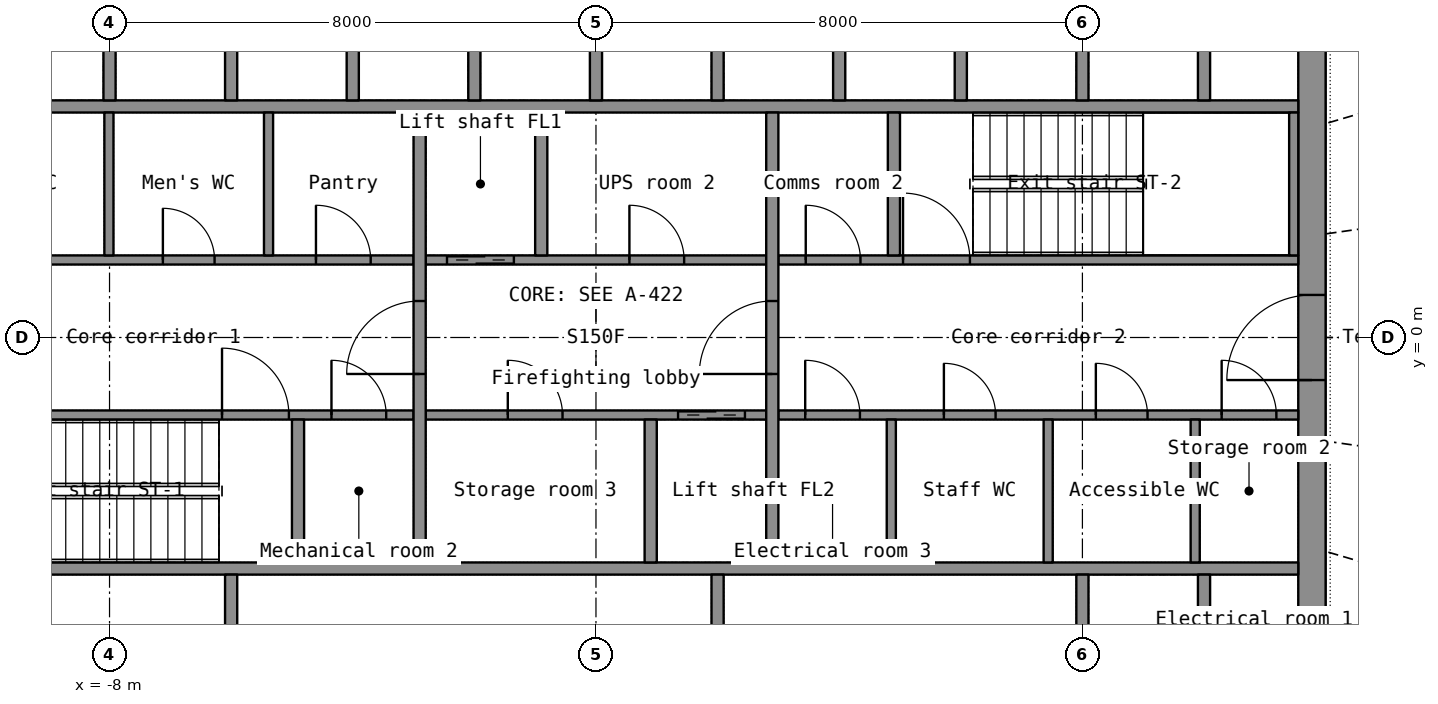
"""IFC4 building model, lengths in metres.
Left out: names, types, materials, properties, quantities, classifications, styles, units other than length and angle.
Written with IfcOpenShell. Run it as: python <this file> out.ifc"""

import sys

from ifc_helpers import new_model, si_unit, direction, frame, frame_2d, origin, place, context, subcontext, project, spatial, rectangle, extrude, element, fill, save


model = new_model("IFC4")
c1 = context("Model", 3, precision=1e-05, world=origin(), true_north=direction((0.0, 1.0)))
c2 = subcontext(c1, "Body", "Model", "MODEL_VIEW")
j1 = project(units=[si_unit("LENGTHUNIT", "METRE"), si_unit("PLANEANGLEUNIT", "RADIAN")], contexts=[c1])
p1 = place(None, origin())
s1 = spatial("IfcSite", under=j1, at=p1, CompositionType="ELEMENT")
p2 = place(p1, origin())
s2 = spatial("IfcBuilding", under=s1, at=p2, CompositionType="ELEMENT")
p3 = place(p2, frame((0.0, 0.0, 164.5)))
s3 = spatial("IfcBuildingStorey", under=s2, at=p3, CompositionType="ELEMENT", Elevation=164.5)
p4 = place(p3, frame((11.775, -7.2, 0.0), z_axis=(0.0, 0.0, 1.0), x_axis=(0.0, 1.0, 0.0)))
e1 = element("IfcWall", 1, at=p4, inside=s3, PredefinedType="SHEAR", context=c2, shape_type="SweptSolid", body=[
    extrude(rectangle(XDim=14.4, YDim=0.45, at=frame_2d((7.2, 0.0))), origin(), (0.0, 0.0, 1.0), 3.3),
])
p5 = place(p4, frame((6.5, 0.0, 0.0)))
e2 = element("IfcOpeningElement", 2, at=p5, cuts=e1, PredefinedType="OPENING", context=c2, shape_type="SweptSolid", body=[
    extrude(rectangle(XDim=1.4, YDim=2.2, at=frame_2d((0.7, 1.1))), frame((0.0, 0.235, 0.0), z_axis=(0.0, -1.0, 0.0), x_axis=(1.0, 0.0, 0.0)), (0.0, 0.0, 1.0), 0.47),
])
for number, where, z_axis, x_axis in (
    (3, (-11.55, -3.8, 0.0), (0.0, 0.0, 1.0), (1.0, 0.0, 0.0)),
    (4, (-11.55, 3.8, 0.0), (0.0, 0.0, 1.0), (1.0, 0.0, 0.0)),
):
    element("IfcWall", number, at=place(p3, frame(where, z_axis=z_axis, x_axis=x_axis)), inside=s3, PredefinedType="SHEAR", context=c2, shape_type="SweptSolid", body=[
        extrude(rectangle(XDim=23.1, YDim=0.2, at=frame_2d((11.55, 0.0))), origin(), (0.0, 0.0, 1.0), 3.3),
    ])
for number, where, z_axis, x_axis in (
    (5, (8.0, -6.75, 0.0), (0.0, 0.0, 1.0), (0.0, 1.0, 0.0)),
    (6, (10.0, -6.75, 0.0), (0.0, 0.0, 1.0), (0.0, 1.0, 0.0)),
):
    element("IfcWall", number, at=place(p3, frame(where, z_axis=z_axis, x_axis=x_axis)), inside=s3, PredefinedType="SHEAR", context=c2, shape_type="SweptSolid", body=[
        extrude(rectangle(XDim=2.85, YDim=0.2, at=frame_2d((1.425, 0.0))), origin(), (0.0, 0.0, 1.0), 3.3),
    ])
for number, where, z_axis, x_axis in (
    (7, (-6.0, -6.75, 0.0), (0.0, 0.0, 1.0), (0.0, 1.0, 0.0)),
    (8, (2.0, -6.75, 0.0), (0.0, 0.0, 1.0), (0.0, 1.0, 0.0)),
):
    element("IfcWall", number, at=place(p3, frame(where, z_axis=z_axis, x_axis=x_axis)), inside=s3, PredefinedType="PARTITIONING", context=c2, shape_type="SweptSolid", body=[
        extrude(rectangle(XDim=2.85, YDim=0.2, at=frame_2d((1.425, 0.0))), origin(), (0.0, 0.0, 1.0), 3.3),
    ])
for number, where, z_axis, x_axis in (
    (9, (-8.0, 3.9, 0.0), (0.0, 0.0, 1.0), (0.0, 1.0, 0.0)),
    (10, (-6.0, 3.9, 0.0), (0.0, 0.0, 1.0), (0.0, 1.0, 0.0)),
    (11, (-4.0, 3.9, 0.0), (0.0, 0.0, 1.0), (0.0, 1.0, 0.0)),
    (12, (-2.0, 3.9, 0.0), (0.0, 0.0, 1.0), (0.0, 1.0, 0.0)),
    (13, (0.0, 3.9, 0.0), (0.0, 0.0, 1.0), (0.0, 1.0, 0.0)),
    (14, (2.0, 3.9, 0.0), (0.0, 0.0, 1.0), (0.0, 1.0, 0.0)),
    (15, (4.0, 3.9, 0.0), (0.0, 0.0, 1.0), (0.0, 1.0, 0.0)),
    (16, (6.0, 3.9, 0.0), (0.0, 0.0, 1.0), (0.0, 1.0, 0.0)),
    (17, (8.0, 3.9, 0.0), (0.0, 0.0, 1.0), (0.0, 1.0, 0.0)),
    (18, (10.0, 3.9, 0.0), (0.0, 0.0, 1.0), (0.0, 1.0, 0.0)),
):
    element("IfcWall", number, at=place(p3, frame(where, z_axis=z_axis, x_axis=x_axis)), inside=s3, PredefinedType="SHEAR", context=c2, shape_type="SweptSolid", body=[
        extrude(rectangle(XDim=2.85, YDim=0.2, at=frame_2d((1.425, 0.0))), origin(), (0.0, 0.0, 1.0), 3.3),
    ])
p6 = place(p3, frame((-11.55, -1.275, 0.0), z_axis=(0.0, 0.0, 1.0), x_axis=(1.0, 0.0, 0.0)))
e19 = element("IfcWall", 19, at=p6, inside=s3, PredefinedType="SHEAR", context=c2, shape_type="SweptSolid", body=[
    extrude(rectangle(XDim=8.55, YDim=0.15, at=frame_2d((4.275, 0.0))), origin(), (0.0, 0.0, 1.0), 3.3),
])
p7 = place(p6, frame((5.4, 0.0, 0.0)))
e20 = element("IfcOpeningElement", 20, at=p7, cuts=e19, PredefinedType="OPENING", context=c2, shape_type="SweptSolid", body=[
    extrude(rectangle(XDim=1.1, YDim=2.15, at=frame_2d((0.55, 1.075))), frame((0.0, 0.085, 0.0), z_axis=(0.0, -1.0, 0.0), x_axis=(1.0, 0.0, 0.0)), (0.0, 0.0, 1.0), 0.17),
])
p8 = place(p6, frame((7.2, 0.0, 0.0)))
e21 = element("IfcOpeningElement", 21, at=p8, cuts=e19, PredefinedType="OPENING", context=c2, shape_type="SweptSolid", body=[
    extrude(rectangle(XDim=0.9, YDim=2.1, at=frame_2d((0.45, 1.05))), frame((0.0, 0.085, 0.0), z_axis=(0.0, -1.0, 0.0), x_axis=(1.0, 0.0, 0.0)), (0.0, 0.0, 1.0), 0.17),
])
p9 = place(p3, frame((-2.8, -1.275, 0.0), z_axis=(0.0, 0.0, 1.0), x_axis=(1.0, 0.0, 0.0)))
e22 = element("IfcWall", 22, at=p9, inside=s3, PredefinedType="SHEAR", context=c2, shape_type="SweptSolid", body=[
    extrude(rectangle(XDim=5.6, YDim=0.15, at=frame_2d((2.8, 0.0))), origin(), (0.0, 0.0, 1.0), 3.3),
])
p10 = place(p9, frame((4.15, 0.0, 0.0)))
e23 = element("IfcOpeningElement", 23, at=p10, cuts=e22, PredefinedType="OPENING", context=c2, shape_type="SweptSolid", body=[
    extrude(rectangle(XDim=1.1, YDim=2.2, at=frame_2d((0.55, 1.1))), frame((0.0, 0.085, 0.0), z_axis=(0.0, -1.0, 0.0), x_axis=(1.0, 0.0, 0.0)), (0.0, 0.0, 1.0), 0.17),
])
p11 = place(p9, frame((1.35, 0.0, 0.0)))
e24 = element("IfcOpeningElement", 24, at=p11, cuts=e22, PredefinedType="OPENING", context=c2, shape_type="SweptSolid", body=[
    extrude(rectangle(XDim=0.9, YDim=2.1, at=frame_2d((0.45, 1.05))), frame((0.0, 0.085, 0.0), z_axis=(0.0, -1.0, 0.0), x_axis=(1.0, 0.0, 0.0)), (0.0, 0.0, 1.0), 0.17),
])
p12 = place(p3, frame((3.0, -1.275, 0.0), z_axis=(0.0, 0.0, 1.0), x_axis=(1.0, 0.0, 0.0)))
e25 = element("IfcWall", 25, at=p12, inside=s3, PredefinedType="PARTITIONING", context=c2, shape_type="SweptSolid", body=[
    extrude(rectangle(XDim=8.55, YDim=0.15, at=frame_2d((4.275, 0.0))), origin(), (0.0, 0.0, 1.0), 3.3),
])
p13 = place(p12, frame((0.441, 0.0, 0.0)))
e26 = element("IfcOpeningElement", 26, at=p13, cuts=e25, PredefinedType="OPENING", context=c2, shape_type="SweptSolid", body=[
    extrude(rectangle(XDim=0.9, YDim=2.1, at=frame_2d((0.45, 1.05))), frame((0.0, 0.085, 0.0), z_axis=(0.0, -1.0, 0.0), x_axis=(1.0, 0.0, 0.0)), (0.0, 0.0, 1.0), 0.17),
])
p14 = place(p12, frame((2.722, 0.0, 0.0)))
e27 = element("IfcOpeningElement", 27, at=p14, cuts=e25, PredefinedType="OPENING", context=c2, shape_type="SweptSolid", body=[
    extrude(rectangle(XDim=0.85, YDim=2.1, at=frame_2d((0.425, 1.05))), frame((0.0, 0.085, 0.0), z_axis=(0.0, -1.0, 0.0), x_axis=(1.0, 0.0, 0.0)), (0.0, 0.0, 1.0), 0.17),
])
p15 = place(p12, frame((5.221, 0.0, 0.0)))
e28 = element("IfcOpeningElement", 28, at=p15, cuts=e25, PredefinedType="OPENING", context=c2, shape_type="SweptSolid", body=[
    extrude(rectangle(XDim=0.85, YDim=2.1, at=frame_2d((0.425, 1.05))), frame((0.0, 0.085, 0.0), z_axis=(0.0, -1.0, 0.0), x_axis=(1.0, 0.0, 0.0)), (0.0, 0.0, 1.0), 0.17),
])
p16 = place(p12, frame((7.29, 0.0, 0.0)))
e29 = element("IfcOpeningElement", 29, at=p16, cuts=e25, PredefinedType="OPENING", context=c2, shape_type="SweptSolid", body=[
    extrude(rectangle(XDim=0.9, YDim=2.1, at=frame_2d((0.45, 1.05))), frame((0.0, 0.085, 0.0), z_axis=(0.0, -1.0, 0.0), x_axis=(1.0, 0.0, 0.0)), (0.0, 0.0, 1.0), 0.17),
])
p17 = place(p3, frame((-11.55, 1.275, 0.0), z_axis=(0.0, 0.0, 1.0), x_axis=(1.0, 0.0, 0.0)))
e30 = element("IfcWall", 30, at=p17, inside=s3, PredefinedType="PARTITIONING", context=c2, shape_type="SweptSolid", body=[
    extrude(rectangle(XDim=8.55, YDim=0.15, at=frame_2d((4.275, 0.0))), origin(), (0.0, 0.0, 1.0), 3.3),
])
p18 = place(p17, frame((1.308, 0.0, 0.0)))
e31 = element("IfcOpeningElement", 31, at=p18, cuts=e30, PredefinedType="OPENING", context=c2, shape_type="SweptSolid", body=[
    extrude(rectangle(XDim=0.85, YDim=2.1, at=frame_2d((0.425, 1.05))), frame((0.0, 0.085, 0.0), z_axis=(0.0, -1.0, 0.0), x_axis=(1.0, 0.0, 0.0)), (0.0, 0.0, 1.0), 0.17),
])
p19 = place(p17, frame((4.427, 0.0, 0.0)))
e32 = element("IfcOpeningElement", 32, at=p19, cuts=e30, PredefinedType="OPENING", context=c2, shape_type="SweptSolid", body=[
    extrude(rectangle(XDim=0.85, YDim=2.1, at=frame_2d((0.425, 1.05))), frame((0.0, 0.085, 0.0), z_axis=(0.0, -1.0, 0.0), x_axis=(1.0, 0.0, 0.0)), (0.0, 0.0, 1.0), 0.17),
])
p20 = place(p17, frame((6.945, 0.0, 0.0)))
e33 = element("IfcOpeningElement", 33, at=p20, cuts=e30, PredefinedType="OPENING", context=c2, shape_type="SweptSolid", body=[
    extrude(rectangle(XDim=0.9, YDim=2.1, at=frame_2d((0.45, 1.05))), frame((0.0, 0.085, 0.0), z_axis=(0.0, -1.0, 0.0), x_axis=(1.0, 0.0, 0.0)), (0.0, 0.0, 1.0), 0.17),
])
p21 = place(p3, frame((-2.8, 1.275, 0.0), z_axis=(0.0, 0.0, 1.0), x_axis=(1.0, 0.0, 0.0)))
e34 = element("IfcWall", 34, at=p21, inside=s3, PredefinedType="SHEAR", context=c2, shape_type="SweptSolid", body=[
    extrude(rectangle(XDim=5.6, YDim=0.15, at=frame_2d((2.8, 0.0))), origin(), (0.0, 0.0, 1.0), 3.3),
])
p22 = place(p21, frame((0.35, 0.0, 0.0)))
e35 = element("IfcOpeningElement", 35, at=p22, cuts=e34, PredefinedType="OPENING", context=c2, shape_type="SweptSolid", body=[
    extrude(rectangle(XDim=1.1, YDim=2.2, at=frame_2d((0.55, 1.1))), frame((0.0, 0.085, 0.0), z_axis=(0.0, -1.0, 0.0), x_axis=(1.0, 0.0, 0.0)), (0.0, 0.0, 1.0), 0.17),
])
p23 = place(p21, frame((3.35, 0.0, 0.0)))
e36 = element("IfcOpeningElement", 36, at=p23, cuts=e34, PredefinedType="OPENING", context=c2, shape_type="SweptSolid", body=[
    extrude(rectangle(XDim=0.9, YDim=2.1, at=frame_2d((0.45, 1.05))), frame((0.0, 0.085, 0.0), z_axis=(0.0, -1.0, 0.0), x_axis=(1.0, 0.0, 0.0)), (0.0, 0.0, 1.0), 0.17),
])
p24 = place(p3, frame((3.0, 1.275, 0.0), z_axis=(0.0, 0.0, 1.0), x_axis=(1.0, 0.0, 0.0)))
e37 = element("IfcWall", 37, at=p24, inside=s3, PredefinedType="SHEAR", context=c2, shape_type="SweptSolid", body=[
    extrude(rectangle(XDim=8.55, YDim=0.15, at=frame_2d((4.275, 0.0))), origin(), (0.0, 0.0, 1.0), 3.3),
])
p25 = place(p24, frame((2.05, 0.0, 0.0)))
e38 = element("IfcOpeningElement", 38, at=p25, cuts=e37, PredefinedType="OPENING", context=c2, shape_type="SweptSolid", body=[
    extrude(rectangle(XDim=1.1, YDim=2.15, at=frame_2d((0.55, 1.075))), frame((0.0, 0.085, 0.0), z_axis=(0.0, -1.0, 0.0), x_axis=(1.0, 0.0, 0.0)), (0.0, 0.0, 1.0), 0.17),
])
p26 = place(p24, frame((0.45, 0.0, 0.0)))
e39 = element("IfcOpeningElement", 39, at=p26, cuts=e37, PredefinedType="OPENING", context=c2, shape_type="SweptSolid", body=[
    extrude(rectangle(XDim=0.9, YDim=2.1, at=frame_2d((0.45, 1.05))), frame((0.0, 0.085, 0.0), z_axis=(0.0, -1.0, 0.0), x_axis=(1.0, 0.0, 0.0)), (0.0, 0.0, 1.0), 0.17),
])
p27 = place(p3, frame((-2.9, -3.7, 0.0), z_axis=(0.0, 0.0, 1.0), x_axis=(0.0, 1.0, 0.0)))
e40 = element("IfcWall", 40, at=p27, inside=s3, PredefinedType="SHEAR", context=c2, shape_type="SweptSolid", body=[
    extrude(rectangle(XDim=7.4, YDim=0.2, at=frame_2d((3.7, 0.0))), origin(), (0.0, 0.0, 1.0), 3.3),
])
p28 = place(p27, frame((3.1, 0.0, 0.0)))
e41 = element("IfcOpeningElement", 41, at=p28, cuts=e40, PredefinedType="OPENING", context=c2, shape_type="SweptSolid", body=[
    extrude(rectangle(XDim=1.2, YDim=2.2, at=frame_2d((0.6, 1.1))), frame((0.0, 0.11, 0.0), z_axis=(0.0, -1.0, 0.0), x_axis=(1.0, 0.0, 0.0)), (0.0, 0.0, 1.0), 0.22),
])
p29 = place(p3, frame((2.9, -3.7, 0.0), z_axis=(0.0, 0.0, 1.0), x_axis=(0.0, 1.0, 0.0)))
e42 = element("IfcWall", 42, at=p29, inside=s3, PredefinedType="SHEAR", context=c2, shape_type="SweptSolid", body=[
    extrude(rectangle(XDim=7.4, YDim=0.2, at=frame_2d((3.7, 0.0))), origin(), (0.0, 0.0, 1.0), 3.3),
])
p30 = place(p29, frame((3.1, 0.0, 0.0)))
e43 = element("IfcOpeningElement", 43, at=p30, cuts=e42, PredefinedType="OPENING", context=c2, shape_type="SweptSolid", body=[
    extrude(rectangle(XDim=1.2, YDim=2.2, at=frame_2d((0.6, 1.1))), frame((0.0, 0.11, 0.0), z_axis=(0.0, -1.0, 0.0), x_axis=(1.0, 0.0, 0.0)), (0.0, 0.0, 1.0), 0.22),
])
for number, where, z_axis, x_axis in (
    (44, (-0.9, 1.35, 0.0), (0.0, 0.0, 1.0), (0.0, 1.0, 0.0)),
    (45, (0.9, -3.7, 0.0), (0.0, 0.0, 1.0), (0.0, 1.0, 0.0)),
):
    element("IfcWall", number, at=place(p3, frame(where, z_axis=z_axis, x_axis=x_axis)), inside=s3, PredefinedType="SHEAR", context=c2, shape_type="SweptSolid", body=[
        extrude(rectangle(XDim=2.35, YDim=0.2, at=frame_2d((1.175, 0.0))), origin(), (0.0, 0.0, 1.0), 3.3),
    ])
p31 = place(p3, frame((11.475, 1.35, 0.0), z_axis=(0.0, 0.0, 1.0), x_axis=(0.0, 1.0, 0.0)))
e46 = element("IfcWall", 46, at=p31, inside=s3, PredefinedType="SHEAR", context=c2, shape_type="SweptSolid", body=[
    extrude(rectangle(XDim=2.35, YDim=0.15, at=frame_2d((1.175, 0.0))), origin(), (0.0, 0.0, 1.0), 3.3),
])
for number, where, z_axis, x_axis in (
    (47, (-4.9, -3.7, 0.0), (0.0, 0.0, 1.0), (0.0, 1.0, 0.0)),
    (48, (4.9, 1.35, 0.0), (0.0, 0.0, 1.0), (0.0, 1.0, 0.0)),
):
    element("IfcWall", number, at=place(p3, frame(where, z_axis=z_axis, x_axis=x_axis)), inside=s3, PredefinedType="SHEAR", context=c2, shape_type="SweptSolid", body=[
        extrude(rectangle(XDim=2.35, YDim=0.2, at=frame_2d((1.175, 0.0))), origin(), (0.0, 0.0, 1.0), 3.3),
    ])
for number, where, z_axis, x_axis in (
    (49, (-8.01, 1.35, 0.0), (0.0, 0.0, 1.0), (0.0, 1.0, 0.0)),
    (50, (-5.385, 1.35, 0.0), (0.0, 0.0, 1.0), (0.0, 1.0, 0.0)),
    (51, (4.857, -3.7, 0.0), (0.0, 0.0, 1.0), (0.0, 1.0, 0.0)),
    (52, (7.437, -3.7, 0.0), (0.0, 0.0, 1.0), (0.0, 1.0, 0.0)),
    (53, (9.855, -3.7, 0.0), (0.0, 0.0, 1.0), (0.0, 1.0, 0.0)),
):
    element("IfcWall", number, at=place(p3, frame(where, z_axis=z_axis, x_axis=x_axis)), inside=s3, PredefinedType="PARTITIONING", context=c2, shape_type="SweptSolid", body=[
        extrude(rectangle(XDim=2.35, YDim=0.15, at=frame_2d((1.175, 0.0))), origin(), (0.0, 0.0, 1.0), 3.3),
    ])
p32 = place(p5, origin())
e54 = element("IfcDoor", 54, at=p32, inside=s3, OperationType="DOUBLE_DOOR_SINGLE_SWING", PredefinedType="DOOR", context=c2, shape_type="SweptSolid", body=[
    extrude(rectangle(XDim=1.4, YDim=2.2, at=frame_2d((0.7, 1.1))), frame((0.0, 0.025, 0.0), z_axis=(0.0, -1.0, 0.0), x_axis=(1.0, 0.0, 0.0)), (0.0, 0.0, 1.0), 0.05),
])
fill(e2, e54)
p33 = place(p28, origin())
e55 = element("IfcDoor", 55, at=p33, inside=s3, OperationType="SINGLE_SWING_LEFT", PredefinedType="DOOR", context=c2, shape_type="SweptSolid", body=[
    extrude(rectangle(XDim=1.2, YDim=2.2, at=frame_2d((0.6, 1.1))), frame((0.0, 0.025, 0.0), z_axis=(0.0, -1.0, 0.0), x_axis=(1.0, 0.0, 0.0)), (0.0, 0.0, 1.0), 0.05),
])
fill(e41, e55)
p34 = place(p30, origin())
e56 = element("IfcDoor", 56, at=p34, inside=s3, OperationType="SINGLE_SWING_LEFT", PredefinedType="DOOR", context=c2, shape_type="SweptSolid", body=[
    extrude(rectangle(XDim=1.2, YDim=2.2, at=frame_2d((0.6, 1.1))), frame((0.0, 0.025, 0.0), z_axis=(0.0, -1.0, 0.0), x_axis=(1.0, 0.0, 0.0)), (0.0, 0.0, 1.0), 0.05),
])
fill(e43, e56)
p35 = place(p22, origin())
e57 = element("IfcDoor", 57, at=p35, inside=s3, OperationType="DOUBLE_DOOR_SLIDING", PredefinedType="DOOR", context=c2, shape_type="SweptSolid", body=[
    extrude(rectangle(XDim=1.1, YDim=2.2, at=frame_2d((0.55, 1.1))), frame((0.0, 0.025, 0.0), z_axis=(0.0, -1.0, 0.0), x_axis=(1.0, 0.0, 0.0)), (0.0, 0.0, 1.0), 0.05),
])
fill(e35, e57)
p36 = place(p10, origin())
e58 = element("IfcDoor", 58, at=p36, inside=s3, OperationType="DOUBLE_DOOR_SLIDING", PredefinedType="DOOR", context=c2, shape_type="SweptSolid", body=[
    extrude(rectangle(XDim=1.1, YDim=2.2, at=frame_2d((0.55, 1.1))), frame((0.0, 0.025, 0.0), z_axis=(0.0, -1.0, 0.0), x_axis=(1.0, 0.0, 0.0)), (0.0, 0.0, 1.0), 0.05),
])
fill(e23, e58)
p37 = place(p7, origin())
e59 = element("IfcDoor", 59, at=p37, inside=s3, OperationType="SINGLE_SWING_LEFT", PredefinedType="DOOR", context=c2, shape_type="SweptSolid", body=[
    extrude(rectangle(XDim=1.1, YDim=2.15, at=frame_2d((0.55, 1.075))), frame((0.0, 0.025, 0.0), z_axis=(0.0, -1.0, 0.0), x_axis=(1.0, 0.0, 0.0)), (0.0, 0.0, 1.0), 0.05),
])
fill(e20, e59)
p38 = place(p25, origin())
e60 = element("IfcDoor", 60, at=p38, inside=s3, OperationType="SINGLE_SWING_LEFT", PredefinedType="DOOR", context=c2, shape_type="SweptSolid", body=[
    extrude(rectangle(XDim=1.1, YDim=2.15, at=frame_2d((0.55, 1.075))), frame((0.0, 0.025, 0.0), z_axis=(0.0, -1.0, 0.0), x_axis=(1.0, 0.0, 0.0)), (0.0, 0.0, 1.0), 0.05),
])
fill(e38, e60)
p39 = place(p19, origin())
e61 = element("IfcDoor", 61, at=p39, inside=s3, OperationType="SINGLE_SWING_LEFT", PredefinedType="DOOR", context=c2, shape_type="SweptSolid", body=[
    extrude(rectangle(XDim=0.85, YDim=2.1, at=frame_2d((0.425, 1.05))), frame((0.0, 0.025, 0.0), z_axis=(0.0, -1.0, 0.0), x_axis=(1.0, 0.0, 0.0)), (0.0, 0.0, 1.0), 0.05),
])
fill(e32, e61)
p40 = place(p20, origin())
e62 = element("IfcDoor", 62, at=p40, inside=s3, OperationType="SINGLE_SWING_LEFT", PredefinedType="DOOR", context=c2, shape_type="SweptSolid", body=[
    extrude(rectangle(XDim=0.9, YDim=2.1, at=frame_2d((0.45, 1.05))), frame((0.0, 0.025, 0.0), z_axis=(0.0, -1.0, 0.0), x_axis=(1.0, 0.0, 0.0)), (0.0, 0.0, 1.0), 0.05),
])
fill(e33, e62)
p41 = place(p13, origin())
e63 = element("IfcDoor", 63, at=p41, inside=s3, OperationType="SINGLE_SWING_LEFT", PredefinedType="DOOR", context=c2, shape_type="SweptSolid", body=[
    extrude(rectangle(XDim=0.9, YDim=2.1, at=frame_2d((0.45, 1.05))), frame((0.0, 0.025, 0.0), z_axis=(0.0, -1.0, 0.0), x_axis=(1.0, 0.0, 0.0)), (0.0, 0.0, 1.0), 0.05),
])
fill(e26, e63)
p42 = place(p14, origin())
e64 = element("IfcDoor", 64, at=p42, inside=s3, OperationType="SINGLE_SWING_LEFT", PredefinedType="DOOR", context=c2, shape_type="SweptSolid", body=[
    extrude(rectangle(XDim=0.85, YDim=2.1, at=frame_2d((0.425, 1.05))), frame((0.0, 0.025, 0.0), z_axis=(0.0, -1.0, 0.0), x_axis=(1.0, 0.0, 0.0)), (0.0, 0.0, 1.0), 0.05),
])
fill(e27, e64)
p43 = place(p15, origin())
e65 = element("IfcDoor", 65, at=p43, inside=s3, OperationType="SINGLE_SWING_LEFT", PredefinedType="DOOR", context=c2, shape_type="SweptSolid", body=[
    extrude(rectangle(XDim=0.85, YDim=2.1, at=frame_2d((0.425, 1.05))), frame((0.0, 0.025, 0.0), z_axis=(0.0, -1.0, 0.0), x_axis=(1.0, 0.0, 0.0)), (0.0, 0.0, 1.0), 0.05),
])
fill(e28, e65)
p44 = place(p16, origin())
e66 = element("IfcDoor", 66, at=p44, inside=s3, OperationType="SINGLE_SWING_LEFT", PredefinedType="DOOR", context=c2, shape_type="SweptSolid", body=[
    extrude(rectangle(XDim=0.9, YDim=2.1, at=frame_2d((0.45, 1.05))), frame((0.0, 0.025, 0.0), z_axis=(0.0, -1.0, 0.0), x_axis=(1.0, 0.0, 0.0)), (0.0, 0.0, 1.0), 0.05),
])
fill(e29, e66)
p45 = place(p23, origin())
e67 = element("IfcDoor", 67, at=p45, inside=s3, OperationType="SINGLE_SWING_LEFT", PredefinedType="DOOR", context=c2, shape_type="SweptSolid", body=[
    extrude(rectangle(XDim=0.9, YDim=2.1, at=frame_2d((0.45, 1.05))), frame((0.0, 0.025, 0.0), z_axis=(0.0, -1.0, 0.0), x_axis=(1.0, 0.0, 0.0)), (0.0, 0.0, 1.0), 0.05),
])
fill(e36, e67)
p46 = place(p11, origin())
e68 = element("IfcDoor", 68, at=p46, inside=s3, OperationType="SINGLE_SWING_LEFT", PredefinedType="DOOR", context=c2, shape_type="SweptSolid", body=[
    extrude(rectangle(XDim=0.9, YDim=2.1, at=frame_2d((0.45, 1.05))), frame((0.0, 0.025, 0.0), z_axis=(0.0, -1.0, 0.0), x_axis=(1.0, 0.0, 0.0)), (0.0, 0.0, 1.0), 0.05),
])
fill(e24, e68)
p47 = place(p26, origin())
e69 = element("IfcDoor", 69, at=p47, inside=s3, OperationType="SINGLE_SWING_LEFT", PredefinedType="DOOR", context=c2, shape_type="SweptSolid", body=[
    extrude(rectangle(XDim=0.9, YDim=2.1, at=frame_2d((0.45, 1.05))), frame((0.0, 0.025, 0.0), z_axis=(0.0, -1.0, 0.0), x_axis=(1.0, 0.0, 0.0)), (0.0, 0.0, 1.0), 0.05),
])
fill(e39, e69)
p48 = place(p8, origin())
e70 = element("IfcDoor", 70, at=p48, inside=s3, OperationType="SINGLE_SWING_LEFT", PredefinedType="DOOR", context=c2, shape_type="SweptSolid", body=[
    extrude(rectangle(XDim=0.9, YDim=2.1, at=frame_2d((0.45, 1.05))), frame((0.0, 0.025, 0.0), z_axis=(0.0, -1.0, 0.0), x_axis=(1.0, 0.0, 0.0)), (0.0, 0.0, 1.0), 0.05),
])
fill(e21, e70)
save(model, sys.argv[1])
